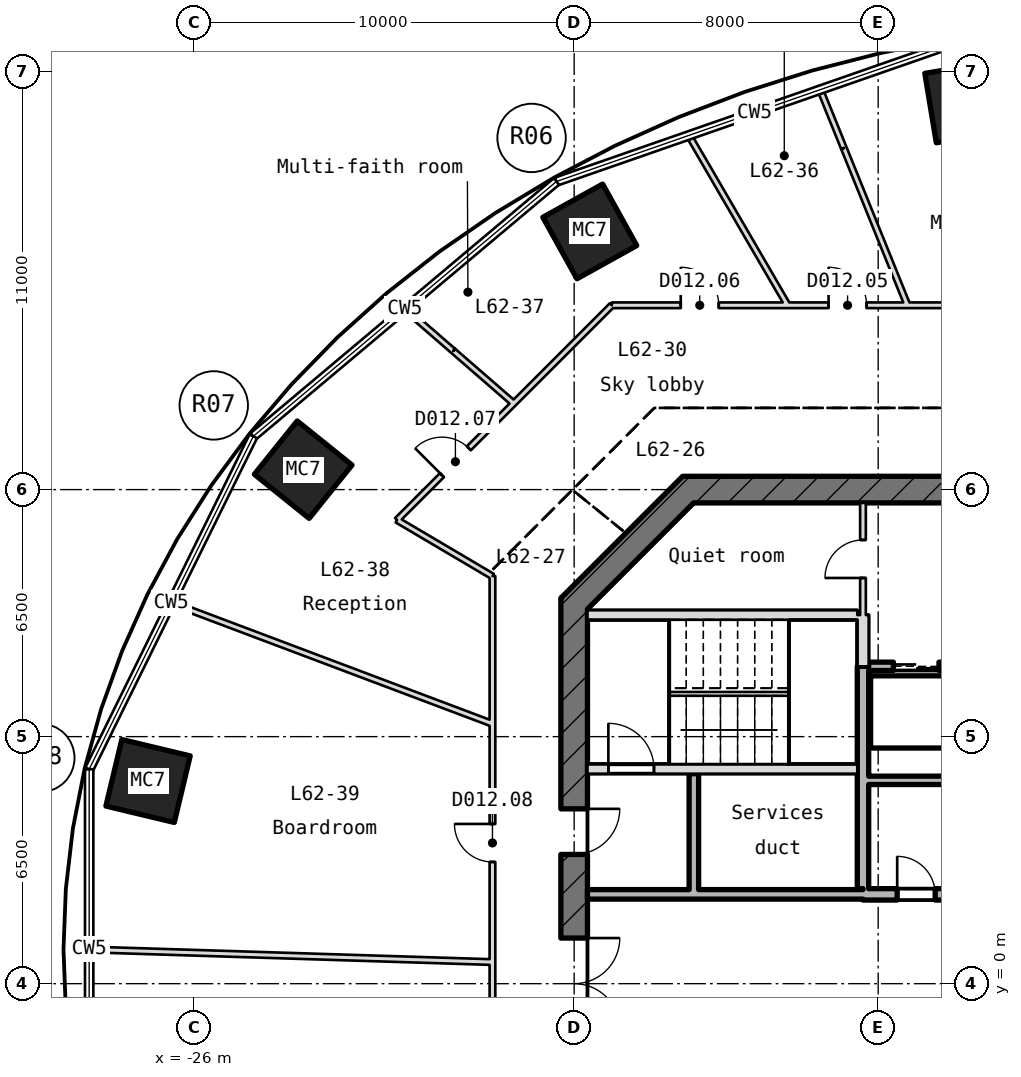
"""IFC4 building model, lengths in metres.
Left out: names, types, materials, properties, quantities, classifications, styles, units other than length and angle.
Written with IfcOpenShell. Run it as: python <this file> out.ifc"""

import sys

from ifc_helpers import new_model, si_unit, direction, frame, frame_2d, origin, origin_2d, place, context, subcontext, project, spatial, rectangle, hollow_rectangle, extrude, element, fill, save


model = new_model("IFC4")
c1 = context("Model", 3, precision=1e-05, world=origin(), true_north=direction((0.0, 1.0)))
c2 = subcontext(c1, "Body", "Model", "MODEL_VIEW")
j1 = project(units=[si_unit("LENGTHUNIT", "METRE"), si_unit("PLANEANGLEUNIT", "RADIAN")], contexts=[c1])
p1 = place(None, origin())
s1 = spatial("IfcSite", under=j1, at=p1, CompositionType="ELEMENT")
p2 = place(p1, origin())
s2 = spatial("IfcBuilding", under=s1, at=p2, CompositionType="ELEMENT")
p3 = place(p2, frame((0.0, 0.0, 279.1)))
s3 = spatial("IfcBuildingStorey", under=s2, at=p3, CompositionType="ELEMENT", Elevation=279.1)
for number, where, z_axis, x_axis in (
    (1, (-5.733, 23.186, -0.25), (0.0, 0.0, 1.0), (0.987, 0.163, 0.0)),
    (2, (-15.588, 19.793, -0.25), (0.0, 0.0, 1.0), (0.874, 0.486, 0.0)),
    (3, (-23.131, 13.524, -0.25), (0.0, 0.0, 1.0), (0.627, 0.779, 0.0)),
    (4, (-27.213, 5.333, -0.25), (0.0, 0.0, 1.0), (0.233, 0.973, 0.0)),
):
    element("IfcColumn", number, at=place(p3, frame(where, z_axis=z_axis, x_axis=x_axis)), inside=s3, PredefinedType="COLUMN", context=c2, shape_type="SweptSolid", body=[
        extrude(hollow_rectangle(XDim=1.8, YDim=1.85, WallThickness=0.06, at=origin_2d()), origin(), (0.0, 0.0, 1.0), 5.47),
    ])
p4 = place(p3, frame((13.145, 13.0, -0.25), z_axis=(0.0, 0.0, 1.0), x_axis=(-1.0, 0.0, 0.0)))
e5 = element("IfcWall", 5, at=p4, inside=s3, PredefinedType="SHEAR", context=c2, shape_type="SweptSolid", body=[
    extrude(rectangle(XDim=26.29, YDim=0.7, at=frame_2d((13.145, 0.0))), origin(), (0.0, 0.0, 1.0), 5.47),
])
p5 = place(p4, frame((11.945, 0.0, 0.25)))
e6 = element("IfcOpeningElement", 6, at=p5, cuts=e5, PredefinedType="OPENING", context=c2, shape_type="SweptSolid", body=[
    extrude(rectangle(XDim=2.4, YDim=2.1, at=frame_2d((1.2, 1.05))), frame((0.0, 0.36, 0.0), z_axis=(0.0, -1.0, 0.0), x_axis=(1.0, 0.0, 0.0)), (0.0, 0.0, 1.0), 0.72),
])
p6 = place(p3, frame((-12.897, 13.103, -0.25), z_axis=(0.0, 0.0, 1.0), x_axis=(-0.707106781187, -0.707106781187, 0.0)))
e7 = element("IfcWall", 7, at=p6, inside=s3, PredefinedType="SHEAR", context=c2, shape_type="SweptSolid", body=[
    extrude(rectangle(XDim=4.533, YDim=0.7, at=frame_2d((2.266, 0.0))), origin(), (0.0, 0.0, 1.0), 5.47),
])
p7 = place(p3, frame((-16.0, 10.145, -0.25), z_axis=(0.0, 0.0, 1.0), x_axis=(0.0, -1.0, 0.0)))
e8 = element("IfcWall", 8, at=p7, inside=s3, PredefinedType="SHEAR", context=c2, shape_type="SweptSolid", body=[
    extrude(rectangle(XDim=20.29, YDim=0.7, at=frame_2d((10.145, 0.0))), origin(), (0.0, 0.0, 1.0), 5.47),
])
p8 = place(p7, frame((8.945, 0.0, 0.25)))
e9 = element("IfcOpeningElement", 9, at=p8, cuts=e8, PredefinedType="OPENING", context=c2, shape_type="SweptSolid", body=[
    extrude(rectangle(XDim=2.4, YDim=2.1, at=frame_2d((1.2, 1.05))), frame((0.0, 0.36, 0.0), z_axis=(0.0, -1.0, 0.0), x_axis=(1.0, 0.0, 0.0)), (0.0, 0.0, 1.0), 0.72),
])
p9 = place(p7, frame((5.545, 0.0, 0.25)))
e10 = element("IfcOpeningElement", 10, at=p9, cuts=e8, PredefinedType="OPENING", context=c2, shape_type="SweptSolid", body=[
    extrude(rectangle(XDim=1.2, YDim=2.1, at=frame_2d((0.6, 1.05))), frame((0.0, 0.36, 0.0), z_axis=(0.0, -1.0, 0.0), x_axis=(1.0, 0.0, 0.0)), (0.0, 0.0, 1.0), 0.72),
])
p10 = place(p3, frame((-15.65, 2.35, 0.0), z_axis=(0.0, 0.0, 1.0), x_axis=(1.0, 0.0, 0.0)))
e11 = element("IfcWall", 11, at=p10, inside=s3, PredefinedType="STANDARD", context=c2, shape_type="SweptSolid", body=[
    extrude(rectangle(XDim=7.25, YDim=0.25, at=frame_2d((3.625, 0.0))), origin(), (0.0, 0.0, 1.0), 5.22),
])
p11 = place(p3, frame((-8.4, 2.35, -0.25), z_axis=(0.0, 0.0, 1.0), x_axis=(1.0, 0.0, 0.0)))
e12 = element("IfcWall", 12, at=p11, inside=s3, PredefinedType="SHEAR", context=c2, shape_type="SweptSolid", body=[
    extrude(rectangle(XDim=16.8, YDim=0.3, at=frame_2d((8.4, 0.0))), origin(), (0.0, 0.0, 1.0), 5.47),
])
p12 = place(p11, frame((0.9, 0.0, 0.25)))
e13 = element("IfcOpeningElement", 13, at=p12, cuts=e12, PredefinedType="OPENING", context=c2, shape_type="SweptSolid", body=[
    extrude(rectangle(XDim=1.0, YDim=2.1, at=frame_2d((0.5, 1.05))), frame((0.0, 0.16, 0.0), z_axis=(0.0, -1.0, 0.0), x_axis=(1.0, 0.0, 0.0)), (0.0, 0.0, 1.0), 0.32),
])
p13 = place(p11, frame((14.9, 0.0, 0.25)))
e14 = element("IfcOpeningElement", 14, at=p13, cuts=e12, PredefinedType="OPENING", context=c2, shape_type="SweptSolid", body=[
    extrude(rectangle(XDim=1.0, YDim=2.1, at=frame_2d((0.5, 1.05))), frame((0.0, 0.16, 0.0), z_axis=(0.0, -1.0, 0.0), x_axis=(1.0, 0.0, 0.0)), (0.0, 0.0, 1.0), 0.32),
])
p14 = place(p3, frame((-8.25, 5.35, 0.0), z_axis=(0.0, 0.0, 1.0), x_axis=(1.0, 0.0, 0.0)))
e15 = element("IfcWall", 15, at=p14, inside=s3, PredefinedType="STANDARD", context=c2, shape_type="SweptSolid", body=[
    extrude(rectangle(XDim=16.5, YDim=0.22, at=frame_2d((8.25, 0.0))), origin(), (0.0, 0.0, 1.0), 5.22),
])
p15 = place(p3, frame((-15.65, 5.65, -0.25), z_axis=(0.0, 0.0, 1.0), x_axis=(1.0, 0.0, 0.0)))
e16 = element("IfcWall", 16, at=p15, inside=s3, PredefinedType="SHEAR", context=c2, shape_type="SweptSolid", body=[
    extrude(rectangle(XDim=7.1, YDim=0.25, at=frame_2d((3.55, 0.0))), origin(), (0.0, 0.0, 1.0), 5.47),
])
p16 = place(p15, frame((0.55, 0.0, 0.25)))
e17 = element("IfcOpeningElement", 17, at=p16, cuts=e16, PredefinedType="OPENING", context=c2, shape_type="SweptSolid", body=[
    extrude(rectangle(XDim=1.2, YDim=2.1, at=frame_2d((0.6, 1.05))), frame((0.0, 0.135, 0.0), z_axis=(0.0, -1.0, 0.0), x_axis=(1.0, 0.0, 0.0)), (0.0, 0.0, 1.0), 0.27),
])
p17 = place(p3, frame((-8.25, 8.35, 0.0), z_axis=(0.0, 0.0, 1.0), x_axis=(1.0, 0.0, 0.0)))
e18 = element("IfcWall", 18, at=p17, inside=s3, PredefinedType="STANDARD", context=c2, shape_type="SweptSolid", body=[
    extrude(rectangle(XDim=16.5, YDim=0.22, at=frame_2d((8.25, 0.0))), origin(), (0.0, 0.0, 1.0), 5.22),
])
p18 = place(p17, frame((0.65, 0.0, 0.0)))
e19 = element("IfcOpeningElement", 19, at=p18, cuts=e18, PredefinedType="OPENING", context=c2, shape_type="SweptSolid", body=[
    extrude(rectangle(XDim=1.2, YDim=2.1, at=frame_2d((0.6, 1.05))), frame((0.0, 0.12, 0.0), z_axis=(0.0, -1.0, 0.0), x_axis=(1.0, 0.0, 0.0)), (0.0, 0.0, 1.0), 0.24),
])
p19 = place(p17, frame((3.45, 0.0, 0.0)))
e20 = element("IfcOpeningElement", 20, at=p19, cuts=e18, PredefinedType="OPENING", context=c2, shape_type="SweptSolid", body=[
    extrude(rectangle(XDim=1.2, YDim=2.1, at=frame_2d((0.6, 1.05))), frame((0.0, 0.12, 0.0), z_axis=(0.0, -1.0, 0.0), x_axis=(1.0, 0.0, 0.0)), (0.0, 0.0, 1.0), 0.24),
])
p20 = place(p17, frame((6.25, 0.0, 0.0)))
e21 = element("IfcOpeningElement", 21, at=p20, cuts=e18, PredefinedType="OPENING", context=c2, shape_type="SweptSolid", body=[
    extrude(rectangle(XDim=1.2, YDim=2.1, at=frame_2d((0.6, 1.05))), frame((0.0, 0.12, 0.0), z_axis=(0.0, -1.0, 0.0), x_axis=(1.0, 0.0, 0.0)), (0.0, 0.0, 1.0), 0.24),
])
p21 = place(p17, frame((9.05, 0.0, 0.0)))
e22 = element("IfcOpeningElement", 22, at=p21, cuts=e18, PredefinedType="OPENING", context=c2, shape_type="SweptSolid", body=[
    extrude(rectangle(XDim=1.2, YDim=2.1, at=frame_2d((0.6, 1.05))), frame((0.0, 0.12, 0.0), z_axis=(0.0, -1.0, 0.0), x_axis=(1.0, 0.0, 0.0)), (0.0, 0.0, 1.0), 0.24),
])
p22 = place(p3, frame((-15.65, 9.7, -0.25), z_axis=(0.0, 0.0, 1.0), x_axis=(1.0, 0.0, 0.0)))
e23 = element("IfcWall", 23, at=p22, inside=s3, PredefinedType="SHEAR", context=c2, shape_type="SweptSolid", body=[
    extrude(rectangle(XDim=7.1, YDim=0.25, at=frame_2d((3.55, 0.0))), origin(), (0.0, 0.0, 1.0), 5.47),
])
p23 = place(p3, frame((-12.85, 2.475, 0.0), z_axis=(0.0, 0.0, 1.0), x_axis=(0.0, 1.0, 0.0)))
e24 = element("IfcWall", 24, at=p23, inside=s3, PredefinedType="STANDARD", context=c2, shape_type="SweptSolid", body=[
    extrude(rectangle(XDim=3.05, YDim=0.25, at=frame_2d((1.525, 0.0))), origin(), (0.0, 0.0, 1.0), 5.22),
])
p24 = place(p3, frame((-8.4, 2.5, -0.25), z_axis=(0.0, 0.0, 1.0), x_axis=(0.0, 1.0, 0.0)))
e25 = element("IfcWall", 25, at=p24, inside=s3, PredefinedType="SHEAR", context=c2, shape_type="SweptSolid", body=[
    extrude(rectangle(XDim=5.85, YDim=0.3, at=frame_2d((2.925, 0.0))), origin(), (0.0, 0.0, 1.0), 5.47),
])
p25 = place(p3, frame((-8.4, 8.35, -0.25), z_axis=(0.0, 0.0, 1.0), x_axis=(0.0, 1.0, 0.0)))
e26 = element("IfcWall", 26, at=p25, inside=s3, PredefinedType="SHEAR", context=c2, shape_type="SweptSolid", body=[
    extrude(rectangle(XDim=1.35, YDim=0.3, at=frame_2d((0.675, 0.0))), origin(), (0.0, 0.0, 1.0), 5.47),
])
p26 = place(p3, frame((-8.4, 9.7, 0.0), z_axis=(0.0, 0.0, 1.0), x_axis=(0.0, 1.0, 0.0)))
e27 = element("IfcWall", 27, at=p26, inside=s3, PredefinedType="PARTITIONING", context=c2, shape_type="SweptSolid", body=[
    extrude(rectangle(XDim=2.95, YDim=0.15, at=frame_2d((1.475, 0.0))), origin(), (0.0, 0.0, 1.0), 5.22),
])
p27 = place(p26, frame((0.975, 0.0, 0.0)))
e28 = element("IfcOpeningElement", 28, at=p27, cuts=e27, PredefinedType="OPENING", context=c2, shape_type="SweptSolid", body=[
    extrude(rectangle(XDim=1.0, YDim=2.1, at=frame_2d((0.5, 1.05))), frame((0.0, 0.085, 0.0), z_axis=(0.0, -1.0, 0.0), x_axis=(1.0, 0.0, 0.0)), (0.0, 0.0, 1.0), 0.17),
])
p28 = place(p3, frame((-15.009, 17.85, 0.0), z_axis=(0.0, 0.0, 1.0), x_axis=(1.0, 0.0, 0.0)))
e29 = element("IfcWall", 29, at=p28, inside=s3, PredefinedType="PARTITIONING", context=c2, shape_type="SweptSolid", body=[
    extrude(rectangle(XDim=30.018, YDim=0.15, at=frame_2d((15.009, 0.0))), origin(), (0.0, 0.0, 1.0), 5.22),
])
p29 = place(p28, frame((21.282, 0.0, 0.0)))
e30 = element("IfcOpeningElement", 30, at=p29, cuts=e29, PredefinedType="OPENING", context=c2, shape_type="SweptSolid", body=[
    extrude(rectangle(XDim=1.0, YDim=2.1, at=frame_2d((0.5, 1.05))), frame((0.0, 0.085, 0.0), z_axis=(0.0, -1.0, 0.0), x_axis=(1.0, 0.0, 0.0)), (0.0, 0.0, 1.0), 0.17),
])
p30 = place(p28, frame((15.592, 0.0, 0.0)))
e31 = element("IfcOpeningElement", 31, at=p30, cuts=e29, PredefinedType="OPENING", context=c2, shape_type="SweptSolid", body=[
    extrude(rectangle(XDim=1.0, YDim=2.1, at=frame_2d((0.5, 1.05))), frame((0.0, 0.085, 0.0), z_axis=(0.0, -1.0, 0.0), x_axis=(1.0, 0.0, 0.0)), (0.0, 0.0, 1.0), 0.17),
])
p31 = place(p28, frame((10.075, 0.0, 0.0)))
e32 = element("IfcOpeningElement", 32, at=p31, cuts=e29, PredefinedType="OPENING", context=c2, shape_type="SweptSolid", body=[
    extrude(rectangle(XDim=1.0, YDim=2.1, at=frame_2d((0.5, 1.05))), frame((0.0, 0.085, 0.0), z_axis=(0.0, -1.0, 0.0), x_axis=(1.0, 0.0, 0.0)), (0.0, 0.0, 1.0), 0.17),
])
p32 = place(p28, frame((5.704, 0.0, 0.0)))
e33 = element("IfcOpeningElement", 33, at=p32, cuts=e29, PredefinedType="OPENING", context=c2, shape_type="SweptSolid", body=[
    extrude(rectangle(XDim=1.0, YDim=2.1, at=frame_2d((0.5, 1.05))), frame((0.0, 0.085, 0.0), z_axis=(0.0, -1.0, 0.0), x_axis=(1.0, 0.0, 0.0)), (0.0, 0.0, 1.0), 0.17),
])
p33 = place(p28, frame((1.814, 0.0, 0.0)))
e34 = element("IfcOpeningElement", 34, at=p33, cuts=e29, PredefinedType="OPENING", context=c2, shape_type="SweptSolid", body=[
    extrude(rectangle(XDim=1.0, YDim=2.1, at=frame_2d((0.5, 1.05))), frame((0.0, 0.085, 0.0), z_axis=(0.0, -1.0, 0.0), x_axis=(1.0, 0.0, 0.0)), (0.0, 0.0, 1.0), 0.17),
])
p34 = place(p3, frame((-20.659, 12.2, 0.0), z_axis=(0.0, 0.0, 1.0), x_axis=(0.707091504448, 0.707122057596, 0.0)))
e35 = element("IfcWall", 35, at=p34, inside=s3, PredefinedType="PARTITIONING", context=c2, shape_type="SweptSolid", body=[
    extrude(rectangle(XDim=7.991, YDim=0.15, at=frame_2d((3.995, 0.0))), origin(), (0.0, 0.0, 1.0), 5.22),
])
p35 = place(p34, frame((1.67, 0.0, 0.0)))
e36 = element("IfcOpeningElement", 36, at=p35, cuts=e35, PredefinedType="OPENING", context=c2, shape_type="SweptSolid", body=[
    extrude(rectangle(XDim=1.0, YDim=2.1, at=frame_2d((0.5, 1.05))), frame((0.0, 0.085, 0.0), z_axis=(0.0, -1.0, 0.0), x_axis=(1.0, 0.0, 0.0)), (0.0, 0.0, 1.0), 0.17),
])
p36 = place(p3, frame((-18.15, -10.891, 0.0), z_axis=(0.0, 0.0, 1.0), x_axis=(0.0, 1.0, 0.0)))
e37 = element("IfcWall", 37, at=p36, inside=s3, PredefinedType="PARTITIONING", context=c2, shape_type="SweptSolid", body=[
    extrude(rectangle(XDim=21.614, YDim=0.15, at=frame_2d((10.807, 0.0))), origin(), (0.0, 0.0, 1.0), 5.22),
])
p37 = place(p36, frame((14.093, 0.0, 0.0)))
e38 = element("IfcOpeningElement", 38, at=p37, cuts=e37, PredefinedType="OPENING", context=c2, shape_type="SweptSolid", body=[
    extrude(rectangle(XDim=1.0, YDim=2.1, at=frame_2d((0.5, 1.05))), frame((0.0, 0.085, 0.0), z_axis=(0.0, -1.0, 0.0), x_axis=(1.0, 0.0, 0.0)), (0.0, 0.0, 1.0), 0.17),
])
p38 = place(p36, frame((7.87, 0.0, 0.0)))
e39 = element("IfcOpeningElement", 39, at=p38, cuts=e37, PredefinedType="OPENING", context=c2, shape_type="SweptSolid", body=[
    extrude(rectangle(XDim=1.0, YDim=2.1, at=frame_2d((0.5, 1.05))), frame((0.0, 0.085, 0.0), z_axis=(0.0, -1.0, 0.0), x_axis=(1.0, 0.0, 0.0)), (0.0, 0.0, 1.0), 0.17),
])
p39 = place(p36, frame((2.92, 0.0, 0.0)))
e40 = element("IfcOpeningElement", 40, at=p39, cuts=e37, PredefinedType="OPENING", context=c2, shape_type="SweptSolid", body=[
    extrude(rectangle(XDim=1.0, YDim=2.1, at=frame_2d((0.5, 1.05))), frame((0.0, 0.085, 0.0), z_axis=(0.0, -1.0, 0.0), x_axis=(1.0, 0.0, 0.0)), (0.0, 0.0, 1.0), 0.17),
])
p40 = place(p3, frame((-7.229, 17.85, 0.0), z_axis=(0.0, 0.0, 1.0), x_axis=(-0.375357230071, 0.926880224103, 0.0)))
e41 = element("IfcWall", 41, at=p40, inside=s3, PredefinedType="PARTITIONING", context=c2, shape_type="SweptSolid", body=[
    extrude(rectangle(XDim=4.464, YDim=0.15, at=frame_2d((2.232, 0.0))), origin(), (0.0, 0.0, 1.0), 4.753),
])
p41 = place(p3, frame((-8.904, 21.988, 0.0), z_axis=(0.0, 0.0, 1.0), x_axis=(-0.375296508976, 0.926904811915, 0.0)))
e42 = element("IfcWall", 42, at=p41, inside=s3, PredefinedType="PARTITIONING", context=c2, shape_type="SweptSolid", body=[
    extrude(rectangle(XDim=1.637, YDim=0.15, at=frame_2d((0.818, 0.0))), origin(), (0.0, 0.0, 1.0), 5.22),
])
p42 = place(p3, frame((-10.382, 17.85, 0.0), z_axis=(0.0, 0.0, 1.0), x_axis=(-0.502765445724, 0.864422874863, 0.0)))
e43 = element("IfcWall", 43, at=p42, inside=s3, PredefinedType="PARTITIONING", context=c2, shape_type="SweptSolid", body=[
    extrude(rectangle(XDim=5.151, YDim=0.15, at=frame_2d((2.575, 0.0))), origin(), (0.0, 0.0, 1.0), 5.22),
])
p43 = place(p3, frame((-17.591, 15.268, 0.0), z_axis=(0.0, 0.0, 1.0), x_axis=(-0.755191662586, 0.655504044808, 0.0)))
e44 = element("IfcWall", 44, at=p43, inside=s3, PredefinedType="PARTITIONING", context=c2, shape_type="SweptSolid", body=[
    extrude(rectangle(XDim=2.106, YDim=0.15, at=frame_2d((1.053, 0.0))), origin(), (0.0, 0.0, 1.0), 4.91),
])
p44 = place(p3, frame((-19.181, 16.649, 0.0), z_axis=(0.0, 0.0, 1.0), x_axis=(-0.755229676687, 0.655460247041, 0.0)))
e45 = element("IfcWall", 45, at=p44, inside=s3, PredefinedType="PARTITIONING", context=c2, shape_type="SweptSolid", body=[
    extrude(rectangle(XDim=1.667, YDim=0.15, at=frame_2d((0.833, 0.0))), origin(), (0.0, 0.0, 1.0), 5.22),
])
p45 = place(p3, frame((-18.15, 10.718, 0.0), z_axis=(0.0, 0.0, 1.0), x_axis=(-0.861086603375, 0.508458318339, 0.0)))
e46 = element("IfcWall", 46, at=p45, inside=s3, PredefinedType="PARTITIONING", context=c2, shape_type="SweptSolid", body=[
    extrude(rectangle(XDim=2.914, YDim=0.15, at=frame_2d((1.457, 0.0))), origin(), (0.0, 0.0, 1.0), 5.22),
])
p46 = place(p3, frame((-18.15, 6.837, 0.0), z_axis=(0.0, 0.0, 1.0), x_axis=(-0.935798247138, 0.352536013271, 0.0)))
e47 = element("IfcWall", 47, at=p46, inside=s3, PredefinedType="PARTITIONING", context=c2, shape_type="SweptSolid", body=[
    extrude(rectangle(XDim=9.013, YDim=0.15, at=frame_2d((4.507, 0.0))), origin(), (0.0, 0.0, 1.0), 5.22),
])
p47 = place(p3, frame((-18.15, 0.568, 0.0), z_axis=(0.0, 0.0, 1.0), x_axis=(-0.999510501518, 0.031285097982, 0.0)))
e48 = element("IfcWall", 48, at=p47, inside=s3, PredefinedType="PARTITIONING", context=c2, shape_type="SweptSolid", body=[
    extrude(rectangle(XDim=10.597, YDim=0.15, at=frame_2d((5.299, 0.0))), origin(), (0.0, 0.0, 1.0), 5.22),
])
p48 = place(p18, origin())
e49 = element("IfcDoor", 49, at=p48, inside=s3, OperationType="DOUBLE_DOOR_SLIDING", PredefinedType="DOOR", context=c2, shape_type="SweptSolid", body=[
    extrude(rectangle(XDim=1.2, YDim=2.1, at=frame_2d((0.6, 1.05))), frame((0.0, 0.025, 0.0), z_axis=(0.0, -1.0, 0.0), x_axis=(1.0, 0.0, 0.0)), (0.0, 0.0, 1.0), 0.05),
])
fill(e19, e49)
p49 = place(p16, origin())
e50 = element("IfcDoor", 50, at=p49, inside=s3, OperationType="SINGLE_SWING_RIGHT", PredefinedType="DOOR", context=c2, shape_type="SweptSolid", body=[
    extrude(rectangle(XDim=1.2, YDim=2.1, at=frame_2d((0.6, 1.05))), frame((0.0, 0.025, 0.0), z_axis=(0.0, -1.0, 0.0), x_axis=(1.0, 0.0, 0.0)), (0.0, 0.0, 1.0), 0.05),
])
fill(e17, e50)
p50 = place(p8, origin())
e51 = element("IfcDoor", 51, at=p50, inside=s3, OperationType="DOUBLE_DOOR_SINGLE_SWING", PredefinedType="DOOR", context=c2, shape_type="SweptSolid", body=[
    extrude(rectangle(XDim=2.4, YDim=2.1, at=frame_2d((1.2, 1.05))), frame((0.0, 0.025, 0.0), z_axis=(0.0, -1.0, 0.0), x_axis=(1.0, 0.0, 0.0)), (0.0, 0.0, 1.0), 0.05),
])
fill(e9, e51)
p51 = place(p9, origin())
e52 = element("IfcDoor", 52, at=p51, inside=s3, OperationType="SINGLE_SWING_RIGHT", PredefinedType="DOOR", context=c2, shape_type="SweptSolid", body=[
    extrude(rectangle(XDim=1.2, YDim=2.1, at=frame_2d((0.6, 1.05))), frame((0.0, 0.025, 0.0), z_axis=(0.0, -1.0, 0.0), x_axis=(1.0, 0.0, 0.0)), (0.0, 0.0, 1.0), 0.05),
])
fill(e10, e52)
p52 = place(p12, origin())
e53 = element("IfcDoor", 53, at=p52, inside=s3, OperationType="SINGLE_SWING_RIGHT", PredefinedType="DOOR", context=c2, shape_type="SweptSolid", body=[
    extrude(rectangle(XDim=1.0, YDim=2.1, at=frame_2d((0.5, 1.05))), frame((0.0, 0.025, 0.0), z_axis=(0.0, -1.0, 0.0), x_axis=(1.0, 0.0, 0.0)), (0.0, 0.0, 1.0), 0.05),
])
fill(e13, e53)
p53 = place(p27, origin())
e54 = element("IfcDoor", 54, at=p53, inside=s3, OperationType="SINGLE_SWING_RIGHT", PredefinedType="DOOR", context=c2, shape_type="SweptSolid", body=[
    extrude(rectangle(XDim=1.0, YDim=2.1, at=frame_2d((0.5, 1.05))), frame((0.0, 0.025, 0.0), z_axis=(0.0, -1.0, 0.0), x_axis=(1.0, 0.0, 0.0)), (0.0, 0.0, 1.0), 0.05),
])
fill(e28, e54)
p54 = place(p32, origin())
e55 = element("IfcDoor", 55, at=p54, inside=s3, OperationType="SINGLE_SWING_RIGHT", PredefinedType="DOOR", context=c2, shape_type="SweptSolid", body=[
    extrude(rectangle(XDim=1.0, YDim=2.1, at=frame_2d((0.5, 1.05))), frame((0.0, 0.025, 0.0), z_axis=(0.0, -1.0, 0.0), x_axis=(1.0, 0.0, 0.0)), (0.0, 0.0, 1.0), 0.05),
])
fill(e33, e55)
p55 = place(p33, origin())
e56 = element("IfcDoor", 56, at=p55, inside=s3, OperationType="SINGLE_SWING_RIGHT", PredefinedType="DOOR", context=c2, shape_type="SweptSolid", body=[
    extrude(rectangle(XDim=1.0, YDim=2.1, at=frame_2d((0.5, 1.05))), frame((0.0, 0.025, 0.0), z_axis=(0.0, -1.0, 0.0), x_axis=(1.0, 0.0, 0.0)), (0.0, 0.0, 1.0), 0.05),
])
fill(e34, e56)
p56 = place(p35, origin())
e57 = element("IfcDoor", 57, at=p56, inside=s3, OperationType="SINGLE_SWING_RIGHT", PredefinedType="DOOR", context=c2, shape_type="SweptSolid", body=[
    extrude(rectangle(XDim=1.0, YDim=2.1, at=frame_2d((0.5, 1.05))), frame((0.0, 0.025, 0.0), z_axis=(0.0, -1.0, 0.0), x_axis=(1.0, 0.0, 0.0)), (0.0, 0.0, 1.0), 0.05),
])
fill(e36, e57)
p57 = place(p37, origin())
e58 = element("IfcDoor", 58, at=p57, inside=s3, OperationType="SINGLE_SWING_RIGHT", PredefinedType="DOOR", context=c2, shape_type="SweptSolid", body=[
    extrude(rectangle(XDim=1.0, YDim=2.1, at=frame_2d((0.5, 1.05))), frame((0.0, 0.025, 0.0), z_axis=(0.0, -1.0, 0.0), x_axis=(1.0, 0.0, 0.0)), (0.0, 0.0, 1.0), 0.05),
])
fill(e38, e58)
save(model, sys.argv[1])
